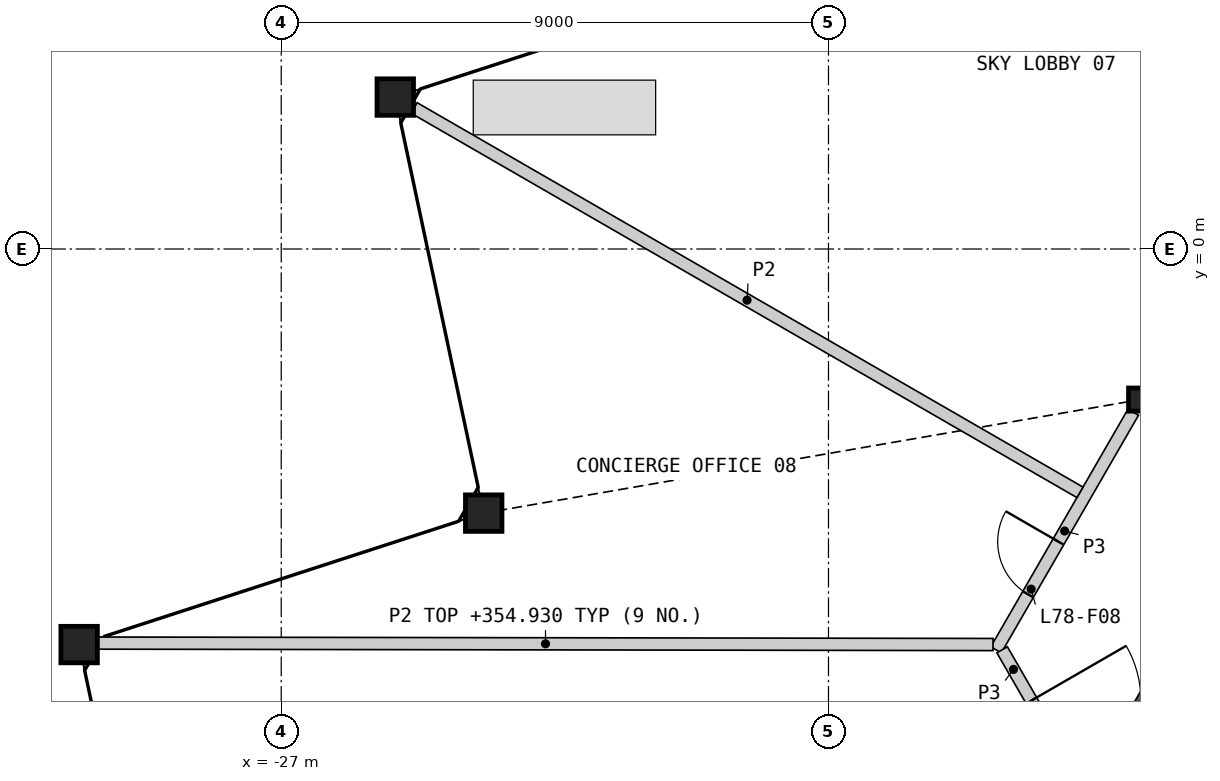
"""IFC4 building model, lengths in metres.
Left out: names, types, materials, properties, quantities, classifications, styles, units other than length and angle.
Written with IfcOpenShell. Run it as: python <this file> out.ifc"""

import sys

from ifc_helpers import new_model, si_unit, direction, frame, frame_2d, origin, origin_2d, place, context, subcontext, project, spatial, polyline, rectangle, hollow_rectangle, i_section, outline, extrude, element, fill, save


model = new_model("IFC4")
c1 = context("Model", 3, precision=1e-05, world=origin(), true_north=direction((0.0, 1.0)))
c2 = subcontext(c1, "Body", "Model", "MODEL_VIEW")
j1 = project(units=[si_unit("LENGTHUNIT", "METRE"), si_unit("PLANEANGLEUNIT", "RADIAN")], contexts=[c1])
p1 = place(None, origin())
s1 = spatial("IfcSite", under=j1, at=p1, CompositionType="ELEMENT")
p2 = place(p1, origin())
s2 = spatial("IfcBuilding", under=s1, at=p2, CompositionType="ELEMENT")
p3 = place(p2, frame((0.0, 0.0, 346.0)))
s3 = spatial("IfcBuildingStorey", under=s2, at=p3, CompositionType="ELEMENT", Elevation=346.0)
for number, where, z_axis, x_axis in (
    (1, (-25.125, 2.499, 0.0), (0.0, 0.0, 1.0), (1.0, 0.0, 0.0)),
    (2, (-23.67, -4.344, 0.0), (0.0, 0.0, 1.0), (1.0, 0.0, 0.0)),
    (3, (-30.324, -6.506, 0.0), (0.0, 0.0, 1.0), (1.0, 0.0, 0.0)),
):
    element("IfcColumn", number, at=place(p3, frame(where, z_axis=z_axis, x_axis=x_axis)), inside=s3, PredefinedType="COLUMN", context=c2, shape_type="SweptSolid", body=[
        extrude(hollow_rectangle(XDim=0.6, YDim=0.6, WallThickness=0.04, at=origin_2d()), origin(), (0.0, 0.0, 1.0), 10.0),
    ])
p4 = place(p3, frame((-12.868, -2.476, 0.0), z_axis=(0.0, 0.0, 1.0), x_axis=(1.0, 0.0, 0.0)))
e4 = element("IfcColumn", 4, at=p4, inside=s3, PredefinedType="COLUMN", context=c2, shape_type="SweptSolid", body=[
    extrude(i_section(OverallWidth=0.396, OverallDepth=0.381, WebThickness=0.019, FlangeThickness=0.03, at=origin_2d()), origin(), (0.0, 0.0, 1.0), 10.0),
])
p5 = place(p3, origin())
e5 = element("IfcWall", 5, at=p5, inside=s3, PredefinedType="SHEAR", context=c2, shape_type="SweptSolid", body=[
    extrude(outline(polyline([(-12.48, -6.606), (-11.961, -6.906), (-11.961, -7.506), (-13.0, -7.506), (-12.48, -6.606)])), origin(), (0.0, 0.0, 1.0), 9.7),
])
p6 = place(p3, frame((-15.244, -6.592, 0.0), z_axis=(0.0, 0.0, 1.0), x_axis=(0.49999094734, 0.866030630277, 0.0)))
e6 = element("IfcWall", 6, at=p6, inside=s3, PredefinedType="PARTITIONING", context=c2, shape_type="SweptSolid", body=[
    extrude(rectangle(XDim=4.513, YDim=0.2, at=frame_2d((2.256, 0.0))), origin(), (0.0, 0.0, 1.0), 9.7),
])
p7 = place(p6, frame((1.053, 0.0, 0.0)))
e7 = element("IfcOpeningElement", 7, at=p7, cuts=e6, PredefinedType="OPENING", context=c2, shape_type="SweptSolid", body=[
    extrude(rectangle(XDim=1.0, YDim=2.1, at=frame_2d((0.5, 1.05))), frame((0.0, 0.11, 0.0), z_axis=(0.0, -1.0, 0.0), x_axis=(1.0, 0.0, 0.0)), (0.0, 0.0, 1.0), 0.22),
])
p8 = place(p3, frame((-15.144, -6.592, 0.0), z_axis=(0.0, 0.0, 1.0), x_axis=(0.499958791762, -0.866049194065, 0.0)))
e8 = element("IfcWall", 8, at=p8, inside=s3, PredefinedType="PARTITIONING", context=c2, shape_type="SweptSolid", body=[
    extrude(rectangle(XDim=3.726, YDim=0.2, at=frame_2d((1.863, 0.0))), origin(), (0.0, 0.0, 1.0), 9.7),
])
p9 = place(p8, frame((0.963, 0.0, 0.0)))
e9 = element("IfcOpeningElement", 9, at=p9, cuts=e8, PredefinedType="OPENING", context=c2, shape_type="SweptSolid", body=[
    extrude(rectangle(XDim=1.8, YDim=2.1, at=frame_2d((0.9, 1.05))), frame((0.0, 0.11, 0.0), z_axis=(0.0, -1.0, 0.0), x_axis=(1.0, 0.0, 0.0)), (0.0, 0.0, 1.0), 0.22),
])
p10 = place(p3, frame((-30.014, -6.482, 0.0), z_axis=(0.0, 0.0, 1.0), x_axis=(0.999998705824, -0.001608834911, 0.0)))
e10 = element("IfcWall", 10, at=p10, inside=s3, PredefinedType="PARTITIONING", context=c2, shape_type="SweptSolid", body=[
    extrude(rectangle(XDim=14.72, YDim=0.2, at=frame_2d((7.36, 0.0))), origin(), (0.0, 0.0, 1.0), 8.93),
])
p11 = place(p3, frame((-24.815, 2.32, 0.0), z_axis=(0.0, 0.0, 1.0), x_axis=(0.866029324615, -0.499993208861, 0.0)))
e11 = element("IfcWall", 11, at=p11, inside=s3, PredefinedType="PARTITIONING", context=c2, shape_type="SweptSolid", body=[
    extrude(rectangle(XDim=12.645, YDim=0.2, at=frame_2d((6.322, 0.0))), origin(), (0.0, 0.0, 1.0), 8.93),
])
p12 = place(p7, origin())
e12 = element("IfcDoor", 12, at=p12, inside=s3, OperationType="SINGLE_SWING_RIGHT", PredefinedType="DOOR", context=c2, shape_type="SweptSolid", body=[
    extrude(rectangle(XDim=1.0, YDim=2.1, at=frame_2d((0.5, 1.05))), frame((0.0, 0.025, 0.0), z_axis=(0.0, -1.0, 0.0), x_axis=(1.0, 0.0, 0.0)), (0.0, 0.0, 1.0), 0.05),
])
fill(e7, e12)
p13 = place(p9, origin())
e13 = element("IfcDoor", 13, at=p13, inside=s3, OperationType="DOUBLE_DOOR_SINGLE_SWING", PredefinedType="DOOR", context=c2, shape_type="SweptSolid", body=[
    extrude(rectangle(XDim=1.8, YDim=2.1, at=frame_2d((0.9, 1.05))), frame((0.0, 0.025, 0.0), z_axis=(0.0, -1.0, 0.0), x_axis=(1.0, 0.0, 0.0)), (0.0, 0.0, 1.0), 0.05),
])
fill(e9, e13)
save(model, sys.argv[1])
